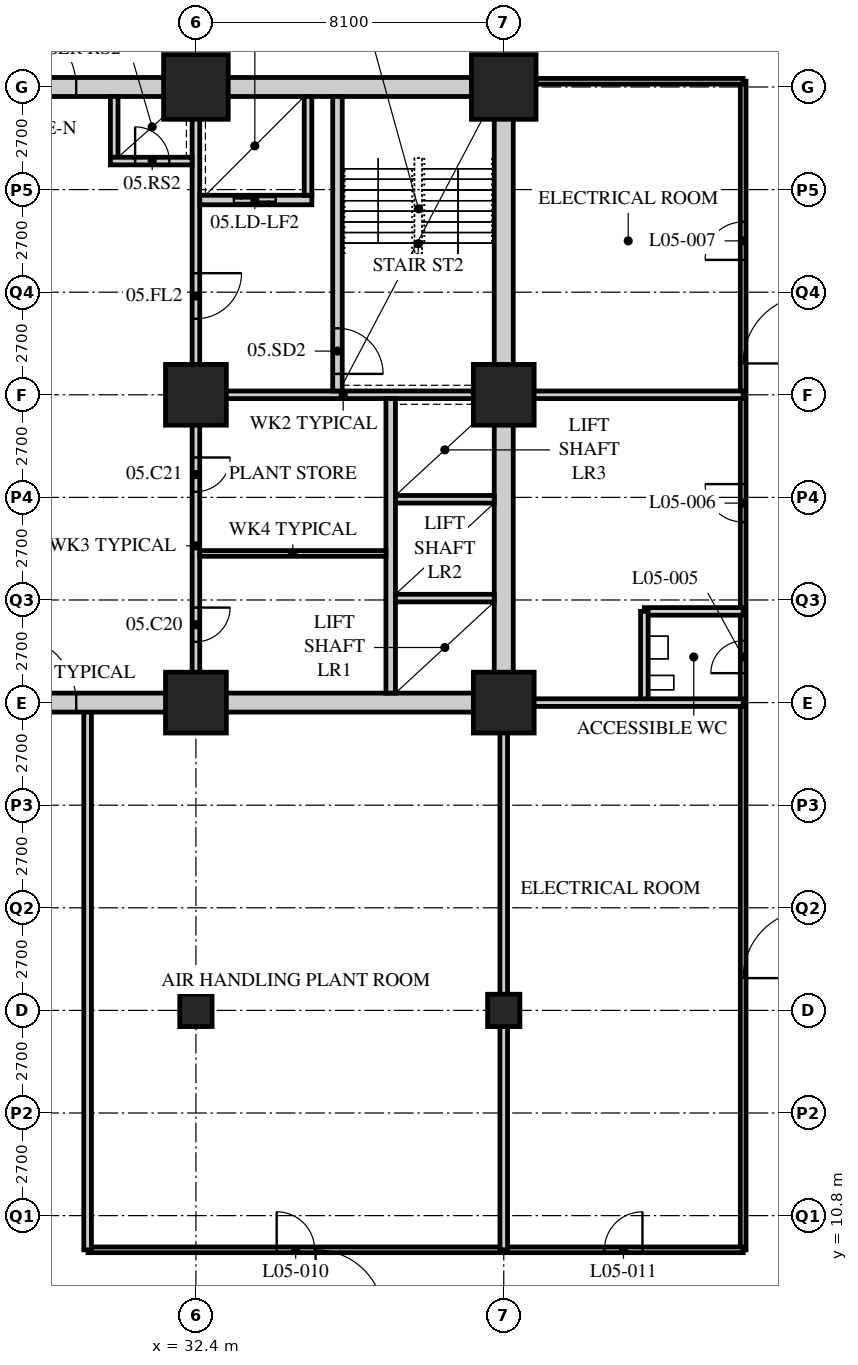
"""IFC4 building model, lengths in metres.
Left out: names, types, materials, properties, quantities, classifications, styles, units other than length and angle.
Written with IfcOpenShell. Run it as: python <this file> out.ifc"""

import sys

from ifc_helpers import new_model, si_unit, direction, frame, frame_2d, origin, origin_2d, place, context, subcontext, project, spatial, rectangle, hollow_rectangle, extrude, element, fill, save


model = new_model("IFC4")
c1 = context("Model", 3, precision=1e-05, world=origin(), true_north=direction((0.0, 1.0)))
c2 = subcontext(c1, "Body", "Model", "MODEL_VIEW")
j1 = project(units=[si_unit("LENGTHUNIT", "METRE"), si_unit("PLANEANGLEUNIT", "RADIAN")], contexts=[c1])
p1 = place(None, origin())
s1 = spatial("IfcSite", under=j1, at=p1, CompositionType="ELEMENT")
p2 = place(p1, origin())
s2 = spatial("IfcBuilding", under=s1, at=p2, CompositionType="ELEMENT")
p3 = place(p2, frame((0.0, 0.0, 27.6)))
s3 = spatial("IfcBuildingStorey", under=s2, at=p3, CompositionType="ELEMENT", Elevation=27.6)
p4 = place(p3, frame((32.4, 16.2, 0.0), z_axis=(0.0, 0.0, 1.0), x_axis=(1.0, 0.0, 0.0)))
e1 = element("IfcColumn", 1, at=p4, inside=s3, PredefinedType="COLUMN", context=c2, shape_type="SweptSolid", body=[
    extrude(hollow_rectangle(XDim=0.85, YDim=0.85, WallThickness=0.085, at=origin_2d()), origin(), (0.0, 0.0, 1.0), 5.4),
])
for number, where, z_axis, x_axis in (
    (2, (32.4, 24.3, 0.0), (0.0, 0.0, 1.0), (1.0, 0.0, 0.0)),
    (3, (32.4, 32.4, 0.0), (0.0, 0.0, 1.0), (1.0, 0.0, 0.0)),
):
    element("IfcColumn", number, at=place(p3, frame(where, z_axis=z_axis, x_axis=x_axis)), inside=s3, PredefinedType="COLUMN", context=c2, shape_type="SweptSolid", body=[
        extrude(hollow_rectangle(XDim=1.6, YDim=1.6, WallThickness=0.15, at=origin_2d()), origin(), (0.0, 0.0, 1.0), 5.4),
    ])
p5 = place(p3, frame((32.4, 40.5, 0.0), z_axis=(0.0, 0.0, 1.0), x_axis=(1.0, 0.0, 0.0)))
e4 = element("IfcColumn", 4, at=p5, inside=s3, PredefinedType="COLUMN", context=c2, shape_type="SweptSolid", body=[
    extrude(hollow_rectangle(XDim=1.7, YDim=1.7, WallThickness=0.16, at=origin_2d()), origin(), (0.0, 0.0, 1.0), 5.4),
])
p6 = place(p3, frame((40.5, 16.2, 0.0), z_axis=(0.0, 0.0, 1.0), x_axis=(1.0, 0.0, 0.0)))
e5 = element("IfcColumn", 5, at=p6, inside=s3, PredefinedType="COLUMN", context=c2, shape_type="SweptSolid", body=[
    extrude(hollow_rectangle(XDim=0.85, YDim=0.85, WallThickness=0.085, at=origin_2d()), origin(), (0.0, 0.0, 1.0), 5.4),
])
for number, where, z_axis, x_axis in (
    (6, (40.5, 24.3, 0.0), (0.0, 0.0, 1.0), (1.0, 0.0, 0.0)),
    (7, (40.5, 32.4, 0.0), (0.0, 0.0, 1.0), (1.0, 0.0, 0.0)),
):
    element("IfcColumn", number, at=place(p3, frame(where, z_axis=z_axis, x_axis=x_axis)), inside=s3, PredefinedType="COLUMN", context=c2, shape_type="SweptSolid", body=[
        extrude(hollow_rectangle(XDim=1.6, YDim=1.6, WallThickness=0.15, at=origin_2d()), origin(), (0.0, 0.0, 1.0), 5.4),
    ])
p7 = place(p3, frame((40.5, 40.5, 0.0), z_axis=(0.0, 0.0, 1.0), x_axis=(1.0, 0.0, 0.0)))
e8 = element("IfcColumn", 8, at=p7, inside=s3, PredefinedType="COLUMN", context=c2, shape_type="SweptSolid", body=[
    extrude(hollow_rectangle(XDim=1.7, YDim=1.7, WallThickness=0.16, at=origin_2d()), origin(), (0.0, 0.0, 1.0), 5.4),
])
p8 = place(p3, frame((46.8, 9.9, 0.0), z_axis=(0.0, 0.0, 1.0), x_axis=(0.0, 1.0, 0.0)))
e9 = element("IfcWall", 9, at=p8, inside=s3, PredefinedType="PARTITIONING", context=c2, shape_type="SweptSolid", body=[
    extrude(rectangle(XDim=30.75, YDim=0.15, at=frame_2d((15.375, 0.0))), origin(), (0.0, 0.0, 1.0), 5.19),
])
p9 = place(p8, frame((15.175, 0.0, 0.0)))
e10 = element("IfcOpeningElement", 10, at=p9, cuts=e9, PredefinedType="OPENING", context=c2, shape_type="SweptSolid", body=[
    extrude(rectangle(XDim=0.85, YDim=2.1, at=frame_2d((0.425, 1.05))), frame((0.0, 0.085, 0.0), z_axis=(0.0, -1.0, 0.0), x_axis=(1.0, 0.0, 0.0)), (0.0, 0.0, 1.0), 0.17),
])
p10 = place(p8, frame((19.15, 0.0, 0.0)))
e11 = element("IfcOpeningElement", 11, at=p10, cuts=e9, PredefinedType="OPENING", context=c2, shape_type="SweptSolid", body=[
    extrude(rectangle(XDim=1.0, YDim=2.1, at=frame_2d((0.5, 1.05))), frame((0.0, 0.085, 0.0), z_axis=(0.0, -1.0, 0.0), x_axis=(1.0, 0.0, 0.0)), (0.0, 0.0, 1.0), 0.17),
])
p11 = place(p8, frame((26.05, 0.0, 0.0)))
e12 = element("IfcOpeningElement", 12, at=p11, cuts=e9, PredefinedType="OPENING", context=c2, shape_type="SweptSolid", body=[
    extrude(rectangle(XDim=1.0, YDim=2.1, at=frame_2d((0.5, 1.05))), frame((0.0, 0.085, 0.0), z_axis=(0.0, -1.0, 0.0), x_axis=(1.0, 0.0, 0.0)), (0.0, 0.0, 1.0), 0.17),
])
p12 = place(p3, frame((46.8, 40.65, 0.0), z_axis=(0.0, 0.0, 1.0), x_axis=(-1.0, 0.0, 0.0)))
e13 = element("IfcWall", 13, at=p12, inside=s3, PredefinedType="PARTITIONING", context=c2, shape_type="SweptSolid", body=[
    extrude(rectangle(XDim=6.168, YDim=0.15, at=frame_2d((3.084, 0.0))), origin(), (0.0, 0.0, 1.0), 4.578),
])
p13 = place(p3, frame((29.56, 9.9, 0.0), z_axis=(0.0, 0.0, 1.0), x_axis=(1.0, 0.0, 0.0)))
e14 = element("IfcWall", 14, at=p13, inside=s3, PredefinedType="PARTITIONING", context=c2, shape_type="SweptSolid", body=[
    extrude(rectangle(XDim=17.24, YDim=0.15, at=frame_2d((8.62, 0.0))), origin(), (0.0, 0.0, 1.0), 5.19),
])
p14 = place(p13, frame((4.965, 0.0, 0.0)))
e15 = element("IfcOpeningElement", 15, at=p14, cuts=e14, PredefinedType="OPENING", context=c2, shape_type="SweptSolid", body=[
    extrude(rectangle(XDim=1.0, YDim=2.1, at=frame_2d((0.5, 1.05))), frame((0.0, 0.085, 0.0), z_axis=(0.0, -1.0, 0.0), x_axis=(1.0, 0.0, 0.0)), (0.0, 0.0, 1.0), 0.17),
])
p15 = place(p13, frame((13.59, 0.0, 0.0)))
e16 = element("IfcOpeningElement", 16, at=p15, cuts=e14, PredefinedType="OPENING", context=c2, shape_type="SweptSolid", body=[
    extrude(rectangle(XDim=1.0, YDim=2.1, at=frame_2d((0.5, 1.05))), frame((0.0, 0.085, 0.0), z_axis=(0.0, -1.0, 0.0), x_axis=(1.0, 0.0, 0.0)), (0.0, 0.0, 1.0), 0.17),
])
p16 = place(p3, frame((40.5, 32.4, 0.0), z_axis=(0.0, 0.0, 1.0), x_axis=(1.0, 0.0, 0.0)))
e17 = element("IfcWall", 17, at=p16, inside=s3, PredefinedType="SOLIDWALL", context=c2, shape_type="SweptSolid", body=[
    extrude(rectangle(XDim=6.3, YDim=0.2, at=frame_2d((3.15, 0.0))), origin(), (0.0, 0.0, 1.0), 4.578),
])
p17 = place(p3, frame((46.8, 26.7, 0.0), z_axis=(0.0, 0.0, 1.0), x_axis=(-1.0, 0.0, 0.0)))
e18 = element("IfcWall", 18, at=p17, inside=s3, PredefinedType="SOLIDWALL", context=c2, shape_type="SweptSolid", body=[
    extrude(rectangle(XDim=2.6, YDim=0.2, at=frame_2d((1.3, 0.0))), origin(), (0.0, 0.0, 1.0), 5.19),
])
p18 = place(p3, frame((44.2, 24.3, 0.0), z_axis=(0.0, 0.0, 1.0), x_axis=(0.0, 1.0, 0.0)))
e19 = element("IfcWall", 19, at=p18, inside=s3, PredefinedType="SOLIDWALL", context=c2, shape_type="SweptSolid", body=[
    extrude(rectangle(XDim=2.4, YDim=0.2, at=frame_2d((1.2, 0.0))), origin(), (0.0, 0.0, 1.0), 5.19),
])
p19 = place(p3, frame((40.5, 9.9, 0.0), z_axis=(0.0, 0.0, 1.0), x_axis=(0.0, 1.0, 0.0)))
e20 = element("IfcWall", 20, at=p19, inside=s3, PredefinedType="SOLIDWALL", context=c2, shape_type="SweptSolid", body=[
    extrude(rectangle(XDim=14.4, YDim=0.2, at=frame_2d((7.2, 0.0))), origin(), (0.0, 0.0, 1.0), 4.578),
])
p20 = place(p3, frame((29.55, 9.9, 0.0), z_axis=(0.0, 0.0, 1.0), x_axis=(0.0, 1.0, 0.0)))
e21 = element("IfcWall", 21, at=p20, inside=s3, PredefinedType="SOLIDWALL", context=c2, shape_type="SweptSolid", body=[
    extrude(rectangle(XDim=14.4, YDim=0.2, at=frame_2d((7.2, 0.0))), origin(), (0.0, 0.0, 1.0), 5.19),
])
p21 = place(p3, frame((40.5, 24.3, 0.0), z_axis=(0.0, 0.0, 1.0), x_axis=(1.0, 0.0, 0.0)))
e22 = element("IfcWall", 22, at=p21, inside=s3, PredefinedType="SOLIDWALL", context=c2, shape_type="SweptSolid", body=[
    extrude(rectangle(XDim=6.3, YDim=0.2, at=frame_2d((3.15, 0.0))), origin(), (0.0, 0.0, 1.0), 4.578),
])
p22 = place(p3, frame((15.95, 24.3, 0.0), z_axis=(0.0, 0.0, 1.0), x_axis=(1.0, 0.0, 0.0)))
e23 = element("IfcWall", 23, at=p22, inside=s3, PredefinedType="SOLIDWALL", context=c2, shape_type="SweptSolid", body=[
    extrude(rectangle(XDim=24.8, YDim=0.5, at=frame_2d((12.4, 0.0))), origin(), (0.0, 0.0, 1.0), 4.54),
])
p23 = place(p22, frame((11.5, 0.0, 0.0)))
e24 = element("IfcOpeningElement", 24, at=p23, cuts=e23, PredefinedType="OPENING", context=c2, shape_type="SweptSolid", body=[
    extrude(rectangle(XDim=1.8, YDim=2.4, at=frame_2d((0.9, 1.2))), frame((0.0, 0.26, 0.0), z_axis=(0.0, -1.0, 0.0), x_axis=(1.0, 0.0, 0.0)), (0.0, 0.0, 1.0), 0.52),
])
p24 = place(p3, frame((15.95, 40.5, 0.0), z_axis=(0.0, 0.0, 1.0), x_axis=(1.0, 0.0, 0.0)))
e25 = element("IfcWall", 25, at=p24, inside=s3, PredefinedType="SOLIDWALL", context=c2, shape_type="SweptSolid", body=[
    extrude(rectangle(XDim=24.8, YDim=0.5, at=frame_2d((12.4, 0.0))), origin(), (0.0, 0.0, 1.0), 4.54),
])
p25 = place(p24, frame((11.5, 0.0, 0.0)))
e26 = element("IfcOpeningElement", 26, at=p25, cuts=e25, PredefinedType="OPENING", context=c2, shape_type="SweptSolid", body=[
    extrude(rectangle(XDim=1.8, YDim=2.4, at=frame_2d((0.9, 1.2))), frame((0.0, 0.26, 0.0), z_axis=(0.0, -1.0, 0.0), x_axis=(1.0, 0.0, 0.0)), (0.0, 0.0, 1.0), 0.52),
])
p26 = place(p3, frame((40.5, 24.55, 0.0), z_axis=(0.0, 0.0, 1.0), x_axis=(0.0, 1.0, 0.0)))
e27 = element("IfcWall", 27, at=p26, inside=s3, PredefinedType="SOLIDWALL", context=c2, shape_type="SweptSolid", body=[
    extrude(rectangle(XDim=15.7, YDim=0.5, at=frame_2d((7.85, 0.0))), origin(), (0.0, 0.0, 1.0), 4.578),
])
p27 = place(p3, frame((32.3, 32.4, 0.0), z_axis=(0.0, 0.0, 1.0), x_axis=(1.0, 0.0, 0.0)))
e28 = element("IfcWall", 28, at=p27, inside=s3, PredefinedType="SOLIDWALL", context=c2, shape_type="SweptSolid", body=[
    extrude(rectangle(XDim=7.95, YDim=0.2, at=frame_2d((3.975, 0.0))), origin(), (0.0, 0.0, 1.0), 4.578),
])
p28 = place(p3, frame((32.4, 32.5, 0.0), z_axis=(0.0, 0.0, 1.0), x_axis=(0.0, 1.0, 0.0)))
e29 = element("IfcWall", 29, at=p28, inside=s3, PredefinedType="SOLIDWALL", context=c2, shape_type="SweptSolid", body=[
    extrude(rectangle(XDim=7.75, YDim=0.2, at=frame_2d((3.875, 0.0))), origin(), (0.0, 0.0, 1.0), 4.578),
])
p29 = place(p28, frame((1.9, 0.0, 0.0)))
e30 = element("IfcOpeningElement", 30, at=p29, cuts=e29, PredefinedType="OPENING", context=c2, shape_type="SweptSolid", body=[
    extrude(rectangle(XDim=1.2, YDim=2.1, at=frame_2d((0.6, 1.05))), frame((0.0, 0.11, 0.0), z_axis=(0.0, -1.0, 0.0), x_axis=(1.0, 0.0, 0.0)), (0.0, 0.0, 1.0), 0.22),
])
p30 = place(p3, frame((37.525, 24.55, 0.0), z_axis=(0.0, 0.0, 1.0), x_axis=(0.0, 1.0, 0.0)))
e31 = element("IfcWall", 31, at=p30, inside=s3, PredefinedType="SOLIDWALL", context=c2, shape_type="SweptSolid", body=[
    extrude(rectangle(XDim=7.75, YDim=0.25, at=frame_2d((3.875, 0.0))), origin(), (0.0, 0.0, 1.0), 5.19),
])
for number, where, z_axis, x_axis in (
    (32, (37.65, 27.05, 0.0), (0.0, 0.0, 1.0), (1.0, 0.0, 0.0)),
    (33, (37.65, 29.65, 0.0), (0.0, 0.0, 1.0), (1.0, 0.0, 0.0)),
):
    element("IfcWall", number, at=place(p3, frame(where, z_axis=z_axis, x_axis=x_axis)), inside=s3, PredefinedType="SOLIDWALL", context=c2, shape_type="SweptSolid", body=[
        extrude(rectangle(XDim=2.6, YDim=0.2, at=frame_2d((1.3, 0.0))), origin(), (0.0, 0.0, 1.0), 5.19),
    ])
p31 = place(p3, frame((36.125, 32.5, 0.0), z_axis=(0.0, 0.0, 1.0), x_axis=(0.0, 1.0, 0.0)))
e34 = element("IfcWall", 34, at=p31, inside=s3, PredefinedType="SOLIDWALL", context=c2, shape_type="SweptSolid", body=[
    extrude(rectangle(XDim=7.75, YDim=0.25, at=frame_2d((3.875, 0.0))), origin(), (0.0, 0.0, 1.0), 5.19),
])
p32 = place(p31, frame((0.45, 0.0, 0.0)))
e35 = element("IfcOpeningElement", 35, at=p32, cuts=e34, PredefinedType="OPENING", context=c2, shape_type="SweptSolid", body=[
    extrude(rectangle(XDim=1.2, YDim=2.1, at=frame_2d((0.6, 1.05))), frame((0.0, 0.135, 0.0), z_axis=(0.0, -1.0, 0.0), x_axis=(1.0, 0.0, 0.0)), (0.0, 0.0, 1.0), 0.27),
])
p33 = place(p3, frame((32.5, 37.525, 0.0), z_axis=(0.0, 0.0, 1.0), x_axis=(1.0, 0.0, 0.0)))
e36 = element("IfcWall", 36, at=p33, inside=s3, PredefinedType="SOLIDWALL", context=c2, shape_type="SweptSolid", body=[
    extrude(rectangle(XDim=2.95, YDim=0.25, at=frame_2d((1.475, 0.0))), origin(), (0.0, 0.0, 1.0), 5.19),
])
p34 = place(p33, frame((0.9, 0.0, 0.0)))
e37 = element("IfcOpeningElement", 37, at=p34, cuts=e36, PredefinedType="OPENING", context=c2, shape_type="SweptSolid", body=[
    extrude(rectangle(XDim=1.1, YDim=2.4, at=frame_2d((0.55, 1.2))), frame((0.0, 0.135, 0.0), z_axis=(0.0, -1.0, 0.0), x_axis=(1.0, 0.0, 0.0)), (0.0, 0.0, 1.0), 0.27),
])
p35 = place(p3, frame((35.35, 37.65, 0.0), z_axis=(0.0, 0.0, 1.0), x_axis=(0.0, 1.0, 0.0)))
e38 = element("IfcWall", 38, at=p35, inside=s3, PredefinedType="SOLIDWALL", context=c2, shape_type="SweptSolid", body=[
    extrude(rectangle(XDim=2.6, YDim=0.2, at=frame_2d((1.3, 0.0))), origin(), (0.0, 0.0, 1.0), 5.19),
])
p36 = place(p3, frame((30.25, 38.65, 0.0), z_axis=(0.0, 0.0, 1.0), x_axis=(0.0, 1.0, 0.0)))
e39 = element("IfcWall", 39, at=p36, inside=s3, PredefinedType="SOLIDWALL", context=c2, shape_type="SweptSolid", body=[
    extrude(rectangle(XDim=1.6, YDim=0.2, at=frame_2d((0.8, 0.0))), origin(), (0.0, 0.0, 1.0), 5.19),
])
p37 = place(p3, frame((30.15, 38.55, 0.0), z_axis=(0.0, 0.0, 1.0), x_axis=(1.0, 0.0, 0.0)))
e40 = element("IfcWall", 40, at=p37, inside=s3, PredefinedType="SOLIDWALL", context=c2, shape_type="SweptSolid", body=[
    extrude(rectangle(XDim=2.15, YDim=0.2, at=frame_2d((1.075, 0.0))), origin(), (0.0, 0.0, 1.0), 5.19),
])
p38 = place(p37, frame((0.65, 0.0, 0.0)))
e41 = element("IfcOpeningElement", 41, at=p38, cuts=e40, PredefinedType="OPENING", context=c2, shape_type="SweptSolid", body=[
    extrude(rectangle(XDim=0.9, YDim=2.1, at=frame_2d((0.45, 1.05))), frame((0.0, 0.11, 0.0), z_axis=(0.0, -1.0, 0.0), x_axis=(1.0, 0.0, 0.0)), (0.0, 0.0, 1.0), 0.22),
])
p39 = place(p3, frame((32.4, 24.55, 0.0), z_axis=(0.0, 0.0, 1.0), x_axis=(0.0, 1.0, 0.0)))
e42 = element("IfcWall", 42, at=p39, inside=s3, PredefinedType="PARTITIONING", context=c2, shape_type="SweptSolid", body=[
    extrude(rectangle(XDim=7.75, YDim=0.2, at=frame_2d((3.875, 0.0))), origin(), (0.0, 0.0, 1.0), 4.578),
])
p40 = place(p39, frame((1.35, 0.0, 0.0)))
e43 = element("IfcOpeningElement", 43, at=p40, cuts=e42, PredefinedType="OPENING", context=c2, shape_type="SweptSolid", body=[
    extrude(rectangle(XDim=0.9, YDim=2.1, at=frame_2d((0.45, 1.05))), frame((0.0, 0.11, 0.0), z_axis=(0.0, -1.0, 0.0), x_axis=(1.0, 0.0, 0.0)), (0.0, 0.0, 1.0), 0.22),
])
p41 = place(p39, frame((5.3, 0.0, 0.0)))
e44 = element("IfcOpeningElement", 44, at=p41, cuts=e42, PredefinedType="OPENING", context=c2, shape_type="SweptSolid", body=[
    extrude(rectangle(XDim=0.9, YDim=2.1, at=frame_2d((0.45, 1.05))), frame((0.0, 0.11, 0.0), z_axis=(0.0, -1.0, 0.0), x_axis=(1.0, 0.0, 0.0)), (0.0, 0.0, 1.0), 0.22),
])
p42 = place(p3, frame((32.5, 28.225, 0.0), z_axis=(0.0, 0.0, 1.0), x_axis=(1.0, 0.0, 0.0)))
e45 = element("IfcWall", 45, at=p42, inside=s3, PredefinedType="PARTITIONING", context=c2, shape_type="SweptSolid", body=[
    extrude(rectangle(XDim=4.9, YDim=0.15, at=frame_2d((2.45, 0.0))), origin(), (0.0, 0.0, 1.0), 5.19),
])
p43 = place(p9, origin())
e46 = element("IfcDoor", 46, at=p43, inside=s3, OperationType="SINGLE_SWING_LEFT", PredefinedType="DOOR", context=c2, shape_type="SweptSolid", body=[
    extrude(rectangle(XDim=0.85, YDim=2.1, at=frame_2d((0.425, 1.05))), frame((0.0, 0.025, 0.0), z_axis=(0.0, -1.0, 0.0), x_axis=(1.0, 0.0, 0.0)), (0.0, 0.0, 1.0), 0.05),
])
fill(e10, e46)
p44 = place(p10, origin())
e47 = element("IfcDoor", 47, at=p44, inside=s3, OperationType="SINGLE_SWING_RIGHT", PredefinedType="DOOR", context=c2, shape_type="SweptSolid", body=[
    extrude(rectangle(XDim=1.0, YDim=2.1, at=frame_2d((0.5, 1.05))), frame((0.0, 0.025, 0.0), z_axis=(0.0, -1.0, 0.0), x_axis=(1.0, 0.0, 0.0)), (0.0, 0.0, 1.0), 0.05),
])
fill(e11, e47)
p45 = place(p11, origin())
e48 = element("IfcDoor", 48, at=p45, inside=s3, OperationType="SINGLE_SWING_LEFT", PredefinedType="DOOR", context=c2, shape_type="SweptSolid", body=[
    extrude(rectangle(XDim=1.0, YDim=2.1, at=frame_2d((0.5, 1.05))), frame((0.0, 0.025, 0.0), z_axis=(0.0, -1.0, 0.0), x_axis=(1.0, 0.0, 0.0)), (0.0, 0.0, 1.0), 0.05),
])
fill(e12, e48)
p46 = place(p14, origin())
e49 = element("IfcDoor", 49, at=p46, inside=s3, OperationType="SINGLE_SWING_LEFT", PredefinedType="DOOR", context=c2, shape_type="SweptSolid", body=[
    extrude(rectangle(XDim=1.0, YDim=2.1, at=frame_2d((0.5, 1.05))), frame((0.0, 0.025, 0.0), z_axis=(0.0, -1.0, 0.0), x_axis=(1.0, 0.0, 0.0)), (0.0, 0.0, 1.0), 0.05),
])
fill(e15, e49)
p47 = place(p15, origin())
e50 = element("IfcDoor", 50, at=p47, inside=s3, OperationType="SINGLE_SWING_RIGHT", PredefinedType="DOOR", context=c2, shape_type="SweptSolid", body=[
    extrude(rectangle(XDim=1.0, YDim=2.1, at=frame_2d((0.5, 1.05))), frame((0.0, 0.025, 0.0), z_axis=(0.0, -1.0, 0.0), x_axis=(1.0, 0.0, 0.0)), (0.0, 0.0, 1.0), 0.05),
])
fill(e16, e50)
p48 = place(p40, origin())
e51 = element("IfcDoor", 51, at=p48, inside=s3, OperationType="SINGLE_SWING_LEFT", PredefinedType="DOOR", context=c2, shape_type="SweptSolid", body=[
    extrude(rectangle(XDim=0.9, YDim=2.1, at=frame_2d((0.45, 1.05))), frame((0.0, 0.025, 0.0), z_axis=(0.0, -1.0, 0.0), x_axis=(1.0, 0.0, 0.0)), (0.0, 0.0, 1.0), 0.05),
])
fill(e43, e51)
p49 = place(p41, origin())
e52 = element("IfcDoor", 52, at=p49, inside=s3, OperationType="SINGLE_SWING_LEFT", PredefinedType="DOOR", context=c2, shape_type="SweptSolid", body=[
    extrude(rectangle(XDim=0.9, YDim=2.1, at=frame_2d((0.45, 1.05))), frame((0.0, 0.025, 0.0), z_axis=(0.0, -1.0, 0.0), x_axis=(1.0, 0.0, 0.0)), (0.0, 0.0, 1.0), 0.05),
])
fill(e44, e52)
p50 = place(p32, origin())
e53 = element("IfcDoor", 53, at=p50, inside=s3, OperationType="SINGLE_SWING_RIGHT", PredefinedType="DOOR", context=c2, shape_type="SweptSolid", body=[
    extrude(rectangle(XDim=1.2, YDim=2.1, at=frame_2d((0.6, 1.05))), frame((0.0, 0.025, 0.0), z_axis=(0.0, -1.0, 0.0), x_axis=(1.0, 0.0, 0.0)), (0.0, 0.0, 1.0), 0.05),
])
fill(e35, e53)
p51 = place(p29, origin())
e54 = element("IfcDoor", 54, at=p51, inside=s3, OperationType="SINGLE_SWING_LEFT", PredefinedType="DOOR", context=c2, shape_type="SweptSolid", body=[
    extrude(rectangle(XDim=1.2, YDim=2.1, at=frame_2d((0.6, 1.05))), frame((0.0, 0.025, 0.0), z_axis=(0.0, -1.0, 0.0), x_axis=(1.0, 0.0, 0.0)), (0.0, 0.0, 1.0), 0.05),
])
fill(e30, e54)
p52 = place(p38, origin())
e55 = element("IfcDoor", 55, at=p52, inside=s3, OperationType="SINGLE_SWING_LEFT", PredefinedType="DOOR", context=c2, shape_type="SweptSolid", body=[
    extrude(rectangle(XDim=0.9, YDim=2.1, at=frame_2d((0.45, 1.05))), frame((0.0, 0.025, 0.0), z_axis=(0.0, -1.0, 0.0), x_axis=(1.0, 0.0, 0.0)), (0.0, 0.0, 1.0), 0.05),
])
fill(e41, e55)
p53 = place(p34, origin())
e56 = element("IfcDoor", 56, at=p53, inside=s3, OperationType="DOUBLE_DOOR_SLIDING", PredefinedType="DOOR", context=c2, shape_type="SweptSolid", body=[
    extrude(rectangle(XDim=1.1, YDim=2.4, at=frame_2d((0.55, 1.2))), frame((0.0, 0.025, 0.0), z_axis=(0.0, -1.0, 0.0), x_axis=(1.0, 0.0, 0.0)), (0.0, 0.0, 1.0), 0.05),
])
fill(e37, e56)
p54 = place(p23, origin())
e57 = element("IfcDoor", 57, at=p54, inside=s3, OperationType="DOUBLE_DOOR_SINGLE_SWING", PredefinedType="DOOR", context=c2, shape_type="SweptSolid", body=[
    extrude(rectangle(XDim=1.8, YDim=2.4, at=frame_2d((0.9, 1.2))), frame((0.0, 0.025, 0.0), z_axis=(0.0, -1.0, 0.0), x_axis=(1.0, 0.0, 0.0)), (0.0, 0.0, 1.0), 0.05),
])
fill(e24, e57)
p55 = place(p25, origin())
e58 = element("IfcDoor", 58, at=p55, inside=s3, OperationType="DOUBLE_DOOR_SINGLE_SWING", PredefinedType="DOOR", context=c2, shape_type="SweptSolid", body=[
    extrude(rectangle(XDim=1.8, YDim=2.4, at=frame_2d((0.9, 1.2))), frame((0.0, 0.025, 0.0), z_axis=(0.0, -1.0, 0.0), x_axis=(1.0, 0.0, 0.0)), (0.0, 0.0, 1.0), 0.05),
])
fill(e26, e58)
save(model, sys.argv[1])
